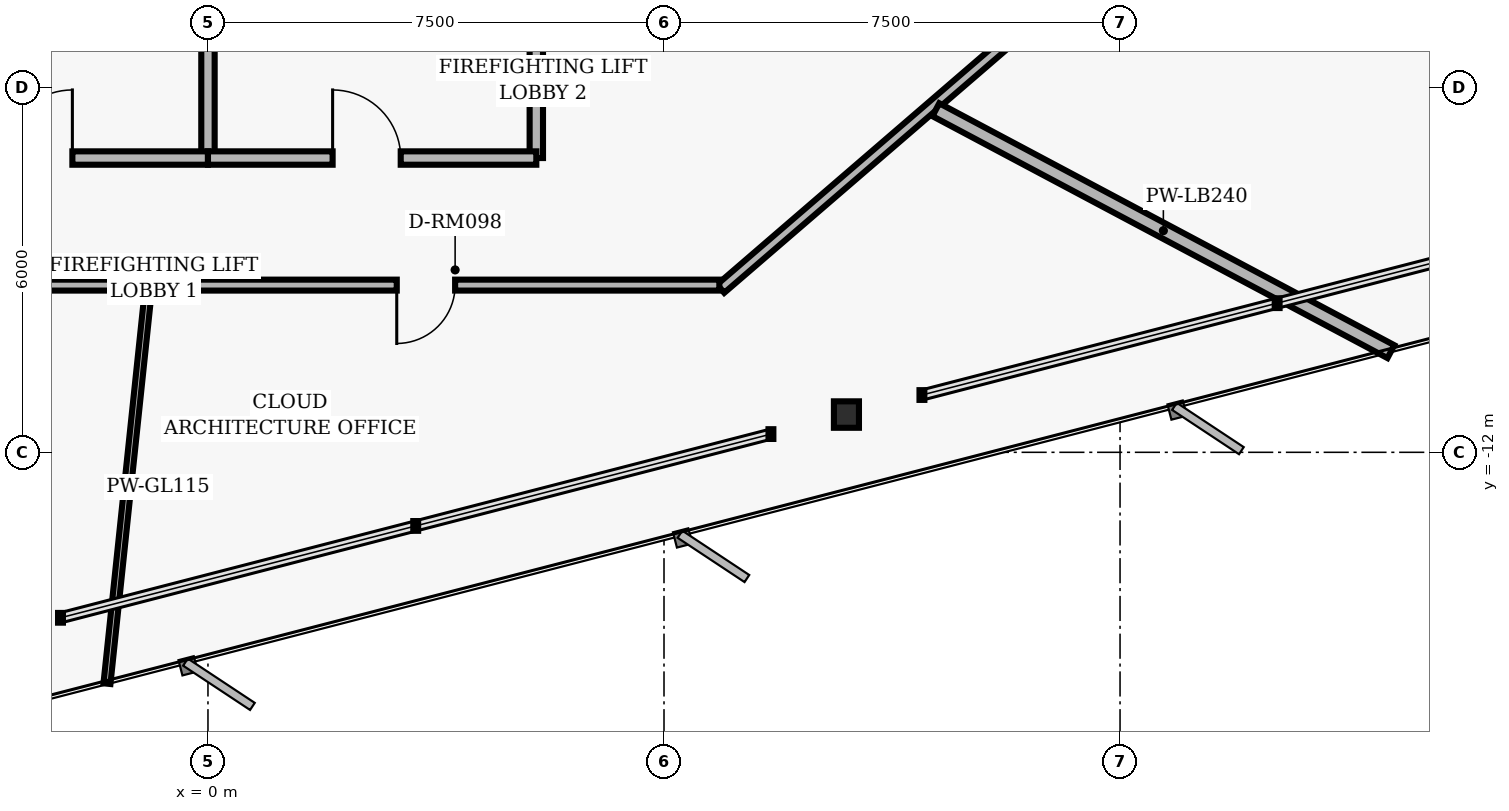
"""IFC4 building model, lengths in metres.
Left out: names, types, materials, properties, quantities, classifications, styles, units other than length and angle.
Written with IfcOpenShell. Run it as: python <this file> out.ifc"""

import sys

from ifc_helpers import new_model, si_unit, direction, frame, frame_2d, origin, origin_2d, place, context, subcontext, project, spatial, rectangle, i_section, extrude, element, fill, save


model = new_model("IFC4")
c1 = context("Model", 3, precision=1e-05, world=origin(), true_north=direction((0.0, 1.0)))
c2 = subcontext(c1, "Body", "Model", "MODEL_VIEW")
j1 = project(units=[si_unit("LENGTHUNIT", "METRE"), si_unit("PLANEANGLEUNIT", "RADIAN")], contexts=[c1])
p1 = place(None, origin())
s1 = spatial("IfcSite", under=j1, at=p1, CompositionType="ELEMENT")
p2 = place(p1, origin())
s2 = spatial("IfcBuilding", under=s1, at=p2, CompositionType="ELEMENT")
p3 = place(p2, frame((0.0, 0.0, 88.64)))
s3 = spatial("IfcBuildingStorey", under=s2, at=p3, CompositionType="ELEMENT", Elevation=88.64)
p4 = place(p3, frame((10.5, -11.379, 0.0), z_axis=(0.0, 0.0, 1.0), x_axis=(1.0, 0.0, 0.0)))
e1 = element("IfcColumn", 1, at=p4, inside=s3, PredefinedType="COLUMN", context=c2, shape_type="SweptSolid", body=[
    extrude(i_section(OverallWidth=0.412, OverallDepth=0.435, WebThickness=0.036, FlangeThickness=0.057, FilletRadius=0.022, at=origin_2d()), origin(), (0.0, 0.0, 1.0), 3.04),
])
p5 = place(p3, frame((5.4, -7.16, 0.0), z_axis=(0.0, 0.0, 1.0), x_axis=(0.0, 1.0, 0.0)))
e2 = element("IfcWall", 2, at=p5, inside=s3, PredefinedType="PARTITIONING", context=c2, shape_type="SweptSolid", body=[
    extrude(rectangle(XDim=2.71, YDim=0.22, at=frame_2d((1.355, 0.0))), origin(), (0.0, 0.0, 1.0), 2.763),
])
p6 = place(p3, frame((0.0, -7.16, 0.0), z_axis=(0.0, 0.0, 1.0), x_axis=(0.0, 1.0, 0.0)))
e3 = element("IfcWall", 3, at=p6, inside=s3, PredefinedType="PARTITIONING", context=c2, shape_type="SweptSolid", body=[
    extrude(rectangle(XDim=2.81, YDim=0.22, at=frame_2d((1.405, 0.0))), origin(), (0.0, 0.0, 1.0), 2.763),
])
p7 = place(p3, frame((-5.4, -7.16, 0.0), z_axis=(0.0, 0.0, 1.0), x_axis=(1.0, 0.0, 0.0)))
e4 = element("IfcWall", 4, at=p7, inside=s3, PredefinedType="PARTITIONING", context=c2, shape_type="SweptSolid", body=[
    extrude(rectangle(XDim=5.4, YDim=0.22, at=frame_2d((2.7, 0.0))), origin(), (0.0, 0.0, 1.0), 2.763),
])
p8 = place(p7, frame((2.05, 0.0, 0.0)))
e5 = element("IfcOpeningElement", 5, at=p8, cuts=e4, PredefinedType="OPENING", context=c2, shape_type="SweptSolid", body=[
    extrude(rectangle(XDim=1.12, YDim=2.02, at=frame_2d((0.56, 1.01))), frame((0.0, 0.12, 0.0), z_axis=(0.0, -1.0, 0.0), x_axis=(1.0, 0.0, 0.0)), (0.0, 0.0, 1.0), 0.24),
])
p9 = place(p3, frame((0.0, -7.16, 0.0), z_axis=(0.0, 0.0, 1.0), x_axis=(1.0, 0.0, 0.0)))
e6 = element("IfcWall", 6, at=p9, inside=s3, PredefinedType="PARTITIONING", context=c2, shape_type="SweptSolid", body=[
    extrude(rectangle(XDim=5.4, YDim=0.22, at=frame_2d((2.7, 0.0))), origin(), (0.0, 0.0, 1.0), 2.763),
])
p10 = place(p9, frame((2.05, 0.0, 0.0)))
e7 = element("IfcOpeningElement", 7, at=p10, cuts=e6, PredefinedType="OPENING", context=c2, shape_type="SweptSolid", body=[
    extrude(rectangle(XDim=1.12, YDim=2.02, at=frame_2d((0.56, 1.01))), frame((0.0, 0.12, 0.0), z_axis=(0.0, -1.0, 0.0), x_axis=(1.0, 0.0, 0.0)), (0.0, 0.0, 1.0), 0.24),
])
p11 = place(p3, frame((13.268, -5.141, 0.0), z_axis=(0.0, 0.0, 1.0), x_axis=(-0.757534501725, -0.65279512766, 0.0)))
e8 = element("IfcWall", 8, at=p11, inside=s3, PredefinedType="PARTITIONING", context=c2, shape_type="SweptSolid", body=[
    extrude(rectangle(XDim=6.385, YDim=0.18, at=frame_2d((3.192, 0.0))), origin(), (0.0, 0.0, 1.0), 2.763),
])
p12 = place(p3, frame((8.41, -9.25, 0.0), z_axis=(0.0, 0.0, 1.0), x_axis=(-1.0, 0.0, 0.0)))
e9 = element("IfcWall", 9, at=p12, inside=s3, PredefinedType="PARTITIONING", context=c2, shape_type="SweptSolid", body=[
    extrude(rectangle(XDim=17.0, YDim=0.18, at=frame_2d((8.5, 0.0))), origin(), (0.0, 0.0, 1.0), 2.277),
])
p13 = place(p12, frame((12.585, 0.0, 0.0)))
e10 = element("IfcOpeningElement", 10, at=p13, cuts=e9, PredefinedType="OPENING", context=c2, shape_type="SweptSolid", body=[
    extrude(rectangle(XDim=0.96, YDim=2.02, at=frame_2d((0.48, 1.01))), frame((0.0, 0.1, 0.0), z_axis=(0.0, -1.0, 0.0), x_axis=(1.0, 0.0, 0.0)), (0.0, 0.0, 1.0), 0.2),
])
p14 = place(p12, frame((4.345, 0.0, 0.0)))
e11 = element("IfcOpeningElement", 11, at=p14, cuts=e9, PredefinedType="OPENING", context=c2, shape_type="SweptSolid", body=[
    extrude(rectangle(XDim=0.96, YDim=2.02, at=frame_2d((0.48, 1.01))), frame((0.0, 0.1, 0.0), z_axis=(0.0, -1.0, 0.0), x_axis=(1.0, 0.0, 0.0)), (0.0, 0.0, 1.0), 0.2),
])
p15 = place(p3, frame((-0.981, -9.33, 0.0), z_axis=(0.0, 0.0, 1.0), x_axis=(-0.10451105245, -0.994523725165, 0.0)))
e12 = element("IfcWall", 12, at=p15, inside=s3, PredefinedType="MOVABLE", context=c2, shape_type="SweptSolid", body=[
    extrude(rectangle(XDim=6.51, YDim=0.115, at=frame_2d((3.255, 0.0))), origin(), (0.0, 0.0, 1.0), 2.763),
])
p16 = place(p3, frame((11.971, -6.365, 0.0), z_axis=(0.0, 0.0, 1.0), x_axis=(0.882953434006, -0.469460577021, 0.0)))
e13 = element("IfcWall", 13, at=p16, inside=s3, PredefinedType="PARTITIONING", context=c2, shape_type="SweptSolid", body=[
    extrude(rectangle(XDim=8.476, YDim=0.24, at=frame_2d((4.238, 0.0))), origin(), (0.0, 0.0, 1.0), 2.763),
])
p17 = place(p8, origin())
e14 = element("IfcDoor", 14, at=p17, inside=s3, OperationType="SINGLE_SWING_RIGHT", PredefinedType="DOOR", context=c2, shape_type="SweptSolid", body=[
    extrude(rectangle(XDim=1.12, YDim=2.02, at=frame_2d((0.56, 1.01))), frame((0.0, 0.025, 0.0), z_axis=(0.0, -1.0, 0.0), x_axis=(1.0, 0.0, 0.0)), (0.0, 0.0, 1.0), 0.05),
])
fill(e5, e14)
p18 = place(p10, origin())
e15 = element("IfcDoor", 15, at=p18, inside=s3, OperationType="SINGLE_SWING_LEFT", PredefinedType="DOOR", context=c2, shape_type="SweptSolid", body=[
    extrude(rectangle(XDim=1.12, YDim=2.02, at=frame_2d((0.56, 1.01))), frame((0.0, 0.025, 0.0), z_axis=(0.0, -1.0, 0.0), x_axis=(1.0, 0.0, 0.0)), (0.0, 0.0, 1.0), 0.05),
])
fill(e7, e15)
p19 = place(p14, origin())
e16 = element("IfcDoor", 16, at=p19, inside=s3, OperationType="SINGLE_SWING_RIGHT", PredefinedType="DOOR", context=c2, shape_type="SweptSolid", body=[
    extrude(rectangle(XDim=0.96, YDim=2.02, at=frame_2d((0.48, 1.01))), frame((0.0, 0.025, 0.0), z_axis=(0.0, -1.0, 0.0), x_axis=(1.0, 0.0, 0.0)), (0.0, 0.0, 1.0), 0.05),
])
fill(e11, e16)
save(model, sys.argv[1])
